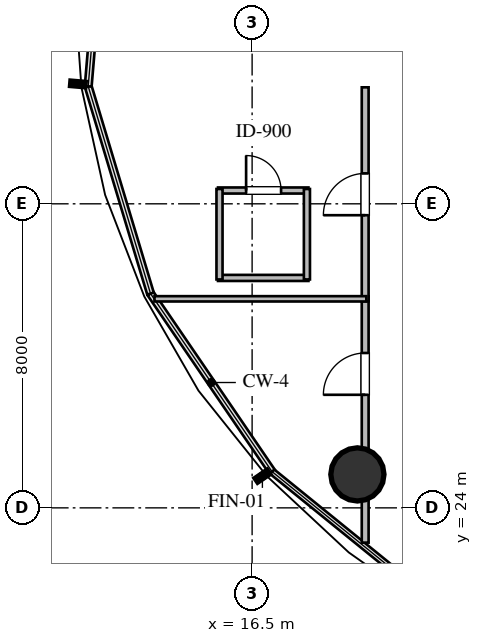
"""IFC4 building model, lengths in metres.
Left out: names, types, materials, properties, quantities, classifications, styles, units other than length and angle.
Written with IfcOpenShell. Run it as: python <this file> out.ifc"""

import sys

from ifc_helpers import new_model, si_unit, direction, frame, frame_2d, origin, origin_2d, place, context, subcontext, project, spatial, rectangle, circle, extrude, element, fill, save


model = new_model("IFC4")
c1 = context("Model", 3, precision=1e-05, world=origin(), true_north=direction((0.0, 1.0)))
c2 = subcontext(c1, "Body", "Model", "MODEL_VIEW")
j1 = project(units=[si_unit("LENGTHUNIT", "METRE"), si_unit("PLANEANGLEUNIT", "RADIAN")], contexts=[c1])
p1 = place(None, origin())
s1 = spatial("IfcSite", under=j1, at=p1, CompositionType="ELEMENT")
p2 = place(p1, origin())
s2 = spatial("IfcBuilding", under=s1, at=p2, CompositionType="ELEMENT")
p3 = place(p2, frame((0.0, 0.0, 70.8)))
s3 = spatial("IfcBuildingStorey", under=s2, at=p3, CompositionType="ELEMENT", Elevation=70.8)
p4 = place(p3, frame((19.27, 24.88, 0.0), z_axis=(0.0, 0.0, 1.0), x_axis=(1.0, 0.0, 0.0)))
e1 = element("IfcColumn", 1, at=p4, inside=s3, PredefinedType="COLUMN", context=c2, shape_type="SweptSolid", body=[
    extrude(circle(Radius=0.7, at=origin_2d()), origin(), (0.0, 0.0, 1.0), 3.6),
])
p5 = place(p3, frame((15.602, 30.05, 0.0), z_axis=(0.0, 0.0, 1.0), x_axis=(1.0, 0.0, 0.0)))
e2 = element("IfcWall", 2, at=p5, inside=s3, PredefinedType="PLUMBINGWALL", context=c2, shape_type="SweptSolid", body=[
    extrude(rectangle(XDim=2.38, YDim=0.16, at=frame_2d((1.19, 0.0))), origin(), (0.0, 0.0, 1.0), 3.36),
])
p6 = place(p3, frame((15.602, 32.35, 0.0), z_axis=(0.0, 0.0, 1.0), x_axis=(1.0, 0.0, 0.0)))
e3 = element("IfcWall", 3, at=p6, inside=s3, PredefinedType="PLUMBINGWALL", context=c2, shape_type="SweptSolid", body=[
    extrude(rectangle(XDim=2.38, YDim=0.16, at=frame_2d((1.19, 0.0))), origin(), (0.0, 0.0, 1.0), 3.36),
])
p7 = place(p6, frame((0.74, 0.0, 0.0)))
e4 = element("IfcOpeningElement", 4, at=p7, cuts=e3, PredefinedType="OPENING", context=c2, shape_type="SweptSolid", body=[
    extrude(rectangle(XDim=0.92, YDim=2.1, at=frame_2d((0.46, 1.05))), frame((0.0, 0.09, 0.0), z_axis=(0.0, -1.0, 0.0), x_axis=(1.0, 0.0, 0.0)), (0.0, 0.0, 1.0), 0.18),
])
p8 = place(p3, frame((15.642, 30.01, 0.0), z_axis=(0.0, 0.0, 1.0), x_axis=(0.0, 1.0, 0.0)))
e5 = element("IfcWall", 5, at=p8, inside=s3, PredefinedType="PLUMBINGWALL", context=c2, shape_type="SweptSolid", body=[
    extrude(rectangle(XDim=2.38, YDim=0.16, at=frame_2d((1.19, 0.0))), origin(), (0.0, 0.0, 1.0), 3.36),
])
p9 = place(p3, frame((17.942, 30.01, 0.0), z_axis=(0.0, 0.0, 1.0), x_axis=(0.0, 1.0, 0.0)))
e6 = element("IfcWall", 6, at=p9, inside=s3, PredefinedType="PLUMBINGWALL", context=c2, shape_type="SweptSolid", body=[
    extrude(rectangle(XDim=2.38, YDim=0.16, at=frame_2d((1.19, 0.0))), origin(), (0.0, 0.0, 1.0), 2.738),
])
p10 = place(p3, frame((19.475, 23.085, 0.0), z_axis=(0.0, 0.0, 1.0), x_axis=(0.0, 1.0, 0.0)))
e7 = element("IfcWall", 7, at=p10, inside=s3, PredefinedType="PARTITIONING", context=c2, shape_type="SweptSolid", body=[
    extrude(rectangle(XDim=6.48, YDim=0.18, at=frame_2d((3.24, 0.0))), origin(), (0.0, 0.0, 1.0), 2.738),
])
p11 = place(p10, frame((3.89, 0.0, 0.0)))
e8 = element("IfcOpeningElement", 8, at=p11, cuts=e7, PredefinedType="OPENING", context=c2, shape_type="SweptSolid", body=[
    extrude(rectangle(XDim=1.1, YDim=2.1, at=frame_2d((0.55, 1.05))), frame((0.0, 0.1, 0.0), z_axis=(0.0, -1.0, 0.0), x_axis=(1.0, 0.0, 0.0)), (0.0, 0.0, 1.0), 0.2),
])
p12 = place(p3, frame((19.475, 29.435, 0.0), z_axis=(0.0, 0.0, 1.0), x_axis=(0.0, 1.0, 0.0)))
e9 = element("IfcWall", 9, at=p12, inside=s3, PredefinedType="PARTITIONING", context=c2, shape_type="SweptSolid", body=[
    extrude(rectangle(XDim=5.63, YDim=0.18, at=frame_2d((2.815, 0.0))), origin(), (0.0, 0.0, 1.0), 3.36),
])
p13 = place(p12, frame((2.265, 0.0, 0.0)))
e10 = element("IfcOpeningElement", 10, at=p13, cuts=e9, PredefinedType="OPENING", context=c2, shape_type="SweptSolid", body=[
    extrude(rectangle(XDim=1.1, YDim=2.1, at=frame_2d((0.55, 1.05))), frame((0.0, 0.1, 0.0), z_axis=(0.0, -1.0, 0.0), x_axis=(1.0, 0.0, 0.0)), (0.0, 0.0, 1.0), 0.2),
])
p14 = place(p3, frame((13.931, 29.5, 0.0), z_axis=(0.0, 0.0, 1.0), x_axis=(1.0, 0.0, 0.0)))
e11 = element("IfcWall", 11, at=p14, inside=s3, PredefinedType="PARTITIONING", context=c2, shape_type="SweptSolid", body=[
    extrude(rectangle(XDim=5.574, YDim=0.14, at=frame_2d((2.787, 0.0))), origin(), (0.0, 0.0, 1.0), 3.36),
])
p15 = place(p7, origin())
e12 = element("IfcDoor", 12, at=p15, inside=s3, OperationType="SINGLE_SWING_LEFT", PredefinedType="DOOR", context=c2, shape_type="SweptSolid", body=[
    extrude(rectangle(XDim=0.92, YDim=2.1, at=frame_2d((0.46, 1.05))), frame((0.0, 0.025, 0.0), z_axis=(0.0, -1.0, 0.0), x_axis=(1.0, 0.0, 0.0)), (0.0, 0.0, 1.0), 0.05),
])
fill(e4, e12)
p16 = place(p11, origin())
e13 = element("IfcDoor", 13, at=p16, inside=s3, OperationType="SINGLE_SWING_LEFT", PredefinedType="DOOR", context=c2, shape_type="SweptSolid", body=[
    extrude(rectangle(XDim=1.1, YDim=2.1, at=frame_2d((0.55, 1.05))), frame((0.0, 0.025, 0.0), z_axis=(0.0, -1.0, 0.0), x_axis=(1.0, 0.0, 0.0)), (0.0, 0.0, 1.0), 0.05),
])
fill(e8, e13)
p17 = place(p13, origin())
e14 = element("IfcDoor", 14, at=p17, inside=s3, OperationType="SINGLE_SWING_LEFT", PredefinedType="DOOR", context=c2, shape_type="SweptSolid", body=[
    extrude(rectangle(XDim=1.1, YDim=2.1, at=frame_2d((0.55, 1.05))), frame((0.0, 0.025, 0.0), z_axis=(0.0, -1.0, 0.0), x_axis=(1.0, 0.0, 0.0)), (0.0, 0.0, 1.0), 0.05),
])
fill(e10, e14)
save(model, sys.argv[1])
